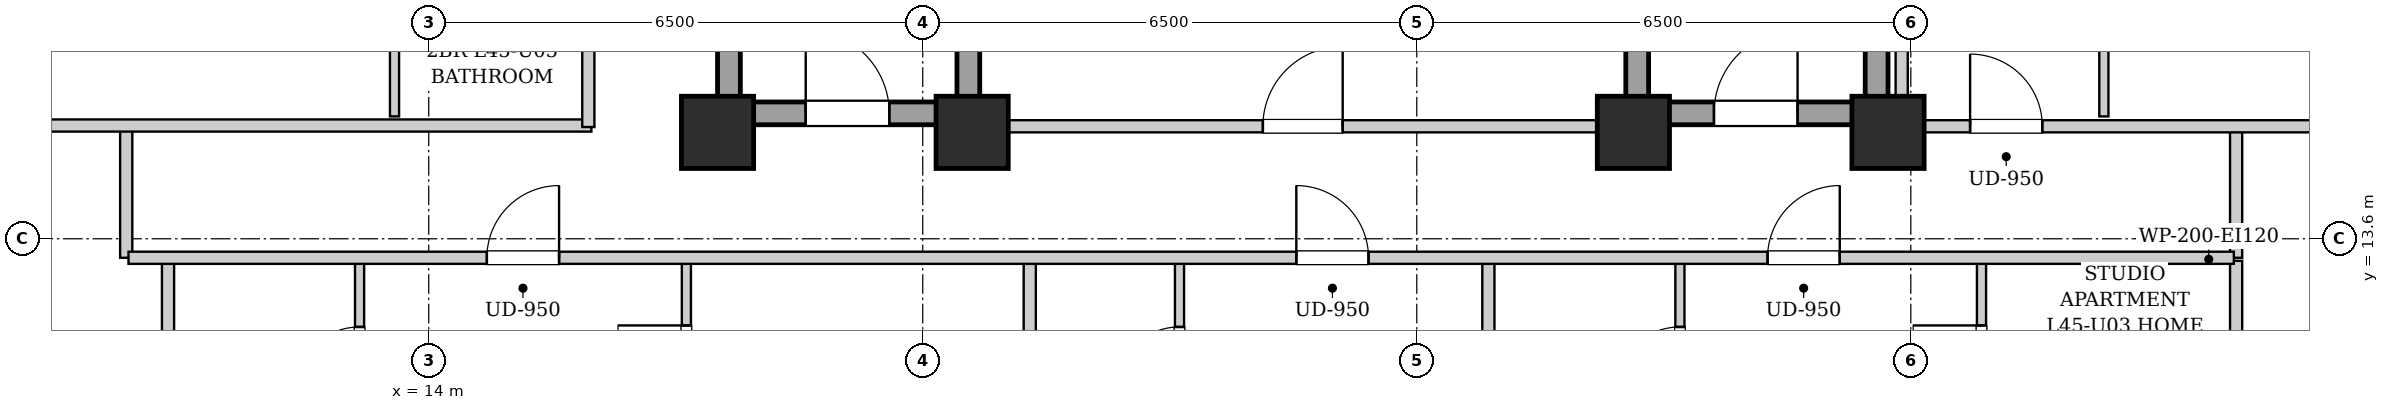
"""IFC4 building model, lengths in metres.
Left out: names, types, materials, properties, quantities, classifications, styles, units other than length and angle.
Written with IfcOpenShell. Run it as: python <this file> out.ifc"""

import sys

from ifc_helpers import new_model, si_unit, direction, frame, frame_2d, origin, origin_2d, place, context, subcontext, project, spatial, rectangle, extrude, element, fill, save


model = new_model("IFC4")
c1 = context("Model", 3, precision=1e-05, world=origin(), true_north=direction((0.0, 1.0)))
c2 = subcontext(c1, "Body", "Model", "MODEL_VIEW")
j1 = project(units=[si_unit("LENGTHUNIT", "METRE"), si_unit("PLANEANGLEUNIT", "RADIAN")], contexts=[c1])
p1 = place(None, origin())
s1 = spatial("IfcSite", under=j1, at=p1, CompositionType="ELEMENT")
p2 = place(p1, origin())
s2 = spatial("IfcBuilding", under=s1, at=p2, CompositionType="ELEMENT")
p3 = place(p2, frame((0.0, 0.0, 156.9)))
s3 = spatial("IfcBuildingStorey", under=s2, at=p3, CompositionType="ELEMENT", Elevation=156.9)
for number, where, z_axis, x_axis in (
    (1, (17.8, 15.0, 0.0), (0.0, 0.0, 1.0), (1.0, 0.0, 0.0)),
    (2, (21.15, 15.0, 0.0), (0.0, 0.0, 1.0), (1.0, 0.0, 0.0)),
    (3, (29.85, 15.0, 0.0), (0.0, 0.0, 1.0), (1.0, 0.0, 0.0)),
    (4, (33.2, 15.0, 0.0), (0.0, 0.0, 1.0), (1.0, 0.0, 0.0)),
):
    element("IfcColumn", number, at=place(p3, frame(where, z_axis=z_axis, x_axis=x_axis)), inside=s3, PredefinedType="COLUMN", context=c2, shape_type="SweptSolid", body=[
        extrude(rectangle(XDim=0.95, YDim=0.95, at=origin_2d()), origin(), (0.0, 0.0, 1.0), 3.25),
    ])
for number, where, z_axis, x_axis in (
    (5, (17.95, 15.1, 0.0), (0.0, 0.0, 1.0), (0.0, 1.0, 0.0)),
    (6, (21.1, 15.1, 0.0), (0.0, 0.0, 1.0), (0.0, 1.0, 0.0)),
):
    element("IfcWall", number, at=place(p3, frame(where, z_axis=z_axis, x_axis=x_axis)), inside=s3, PredefinedType="SHEAR", context=c2, shape_type="SweptSolid", body=[
        extrude(rectangle(XDim=9.0, YDim=0.3, at=frame_2d((4.5, 0.0))), origin(), (0.0, 0.0, 1.0), 2.99),
    ])
p4 = place(p3, frame((18.1, 15.25, 0.0), z_axis=(0.0, 0.0, 1.0), x_axis=(1.0, 0.0, 0.0)))
e7 = element("IfcWall", 7, at=p4, inside=s3, PredefinedType="SHEAR", context=c2, shape_type="SweptSolid", body=[
    extrude(rectangle(XDim=2.85, YDim=0.3, at=frame_2d((1.425, 0.0))), origin(), (0.0, 0.0, 1.0), 2.99),
])
p5 = place(p4, frame((0.86, 0.0, 0.0)))
e8 = element("IfcOpeningElement", 8, at=p5, cuts=e7, PredefinedType="OPENING", context=c2, shape_type="SweptSolid", body=[
    extrude(rectangle(XDim=1.1, YDim=2.05, at=frame_2d((0.55, 1.025))), frame((0.0, 0.16, 0.0), z_axis=(0.0, -1.0, 0.0), x_axis=(1.0, 0.0, 0.0)), (0.0, 0.0, 1.0), 0.32),
])
for number, where, z_axis, x_axis in (
    (9, (29.9, 15.1, 0.0), (0.0, 0.0, 1.0), (0.0, 1.0, 0.0)),
    (10, (33.05, 15.1, 0.0), (0.0, 0.0, 1.0), (0.0, 1.0, 0.0)),
):
    element("IfcWall", number, at=place(p3, frame(where, z_axis=z_axis, x_axis=x_axis)), inside=s3, PredefinedType="SHEAR", context=c2, shape_type="SweptSolid", body=[
        extrude(rectangle(XDim=9.0, YDim=0.3, at=frame_2d((4.5, 0.0))), origin(), (0.0, 0.0, 1.0), 2.99),
    ])
p6 = place(p3, frame((30.05, 15.25, 0.0), z_axis=(0.0, 0.0, 1.0), x_axis=(1.0, 0.0, 0.0)))
e11 = element("IfcWall", 11, at=p6, inside=s3, PredefinedType="SHEAR", context=c2, shape_type="SweptSolid", body=[
    extrude(rectangle(XDim=2.85, YDim=0.3, at=frame_2d((1.425, 0.0))), origin(), (0.0, 0.0, 1.0), 2.99),
])
p7 = place(p6, frame((0.86, 0.0, 0.0)))
e12 = element("IfcOpeningElement", 12, at=p7, cuts=e11, PredefinedType="OPENING", context=c2, shape_type="SweptSolid", body=[
    extrude(rectangle(XDim=1.1, YDim=2.05, at=frame_2d((0.55, 1.025))), frame((0.0, 0.16, 0.0), z_axis=(0.0, -1.0, 0.0), x_axis=(1.0, 0.0, 0.0)), (0.0, 0.0, 1.0), 0.32),
])
p8 = place(p3, frame((21.25, 15.08, 0.0), z_axis=(0.0, 0.0, 1.0), x_axis=(1.0, 0.0, 0.0)))
e13 = element("IfcWall", 13, at=p8, inside=s3, PredefinedType="PARTITIONING", context=c2, shape_type="SweptSolid", body=[
    extrude(rectangle(XDim=8.5, YDim=0.16, at=frame_2d((4.25, 0.0))), origin(), (0.0, 0.0, 1.0), 2.442),
])
p9 = place(p8, frame((3.725, 0.0, 0.0)))
e14 = element("IfcOpeningElement", 14, at=p9, cuts=e13, PredefinedType="OPENING", context=c2, shape_type="SweptSolid", body=[
    extrude(rectangle(XDim=1.05, YDim=2.05, at=frame_2d((0.525, 1.025))), frame((0.0, 0.09, 0.0), z_axis=(0.0, -1.0, 0.0), x_axis=(1.0, 0.0, 0.0)), (0.0, 0.0, 1.0), 0.18),
])
for number, where, z_axis, x_axis in (
    (15, (10.02, 13.35, 0.0), (0.0, 0.0, 1.0), (0.0, 1.0, 0.0)),
    (16, (37.78, 13.35, 0.0), (0.0, 0.0, 1.0), (0.0, 1.0, 0.0)),
):
    element("IfcWall", number, at=place(p3, frame(where, z_axis=z_axis, x_axis=x_axis)), inside=s3, PredefinedType="PARTITIONING", context=c2, shape_type="SweptSolid", body=[
        extrude(rectangle(XDim=1.74, YDim=0.16, at=frame_2d((0.87, 0.0))), origin(), (0.0, 0.0, 1.0), 2.99),
    ])
p10 = place(p3, frame((7.78, 15.09, 0.0), z_axis=(0.0, 0.0, 1.0), x_axis=(1.0, 0.0, 0.0)))
e17 = element("IfcWall", 17, at=p10, inside=s3, PredefinedType="PARTITIONING", context=c2, shape_type="SweptSolid", body=[
    extrude(rectangle(XDim=8.36, YDim=0.16, at=frame_2d((4.18, 0.0))), origin(), (0.0, 0.0, 1.0), 2.442),
])
p11 = place(p3, frame((10.57, 4.08, 0.0), z_axis=(0.0, 0.0, 1.0), x_axis=(0.0, 1.0, 0.0)))
e18 = element("IfcWall", 18, at=p11, inside=s3, PredefinedType="PARTITIONING", context=c2, shape_type="SweptSolid", body=[
    extrude(rectangle(XDim=9.23, YDim=0.16, at=frame_2d((4.615, 0.0))), origin(), (0.0, 0.0, 1.0), 2.99),
])
p12 = place(p3, frame((13.09, 10.71, 0.0), z_axis=(0.0, 0.0, 1.0), x_axis=(0.0, 1.0, 0.0)))
e19 = element("IfcWall", 19, at=p12, inside=s3, PredefinedType="PARTITIONING", context=c2, shape_type="SweptSolid", body=[
    extrude(rectangle(XDim=2.6, YDim=0.12, at=frame_2d((1.3, 0.0))), origin(), (0.0, 0.0, 1.0), 2.99),
])
p13 = place(p12, frame((0.87, 0.0, 0.0)))
e20 = element("IfcOpeningElement", 20, at=p13, cuts=e19, PredefinedType="OPENING", context=c2, shape_type="SweptSolid", body=[
    extrude(rectangle(XDim=0.86, YDim=2.05, at=frame_2d((0.43, 1.025))), frame((0.0, 0.07, 0.0), z_axis=(0.0, -1.0, 0.0), x_axis=(1.0, 0.0, 0.0)), (0.0, 0.0, 1.0), 0.14),
])
p14 = place(p3, frame((17.39, 10.71, 0.0), z_axis=(0.0, 0.0, 1.0), x_axis=(0.0, 1.0, 0.0)))
e21 = element("IfcWall", 21, at=p14, inside=s3, PredefinedType="PARTITIONING", context=c2, shape_type="SweptSolid", body=[
    extrude(rectangle(XDim=2.6, YDim=0.12, at=frame_2d((1.3, 0.0))), origin(), (0.0, 0.0, 1.0), 2.99),
])
p15 = place(p14, frame((0.85, 0.0, 0.0)))
e22 = element("IfcOpeningElement", 22, at=p15, cuts=e21, PredefinedType="OPENING", context=c2, shape_type="SweptSolid", body=[
    extrude(rectangle(XDim=0.9, YDim=2.05, at=frame_2d((0.45, 1.025))), frame((0.0, 0.07, 0.0), z_axis=(0.0, -1.0, 0.0), x_axis=(1.0, 0.0, 0.0)), (0.0, 0.0, 1.0), 0.14),
])
p16 = place(p3, frame((21.908, 4.08, 0.0), z_axis=(0.0, 0.0, 1.0), x_axis=(0.0, 1.0, 0.0)))
e23 = element("IfcWall", 23, at=p16, inside=s3, PredefinedType="PARTITIONING", context=c2, shape_type="SweptSolid", body=[
    extrude(rectangle(XDim=9.23, YDim=0.16, at=frame_2d((4.615, 0.0))), origin(), (0.0, 0.0, 1.0), 2.99),
])
p17 = place(p3, frame((23.878, 10.71, 0.0), z_axis=(0.0, 0.0, 1.0), x_axis=(0.0, 1.0, 0.0)))
e24 = element("IfcWall", 24, at=p17, inside=s3, PredefinedType="PARTITIONING", context=c2, shape_type="SweptSolid", body=[
    extrude(rectangle(XDim=2.6, YDim=0.12, at=frame_2d((1.3, 0.0))), origin(), (0.0, 0.0, 1.0), 2.99),
])
p18 = place(p17, frame((0.87, 0.0, 0.0)))
e25 = element("IfcOpeningElement", 25, at=p18, cuts=e24, PredefinedType="OPENING", context=c2, shape_type="SweptSolid", body=[
    extrude(rectangle(XDim=0.86, YDim=2.05, at=frame_2d((0.43, 1.025))), frame((0.0, 0.07, 0.0), z_axis=(0.0, -1.0, 0.0), x_axis=(1.0, 0.0, 0.0)), (0.0, 0.0, 1.0), 0.14),
])
p19 = place(p3, frame((37.78, 10.65, 0.0), z_axis=(0.0, 0.0, 1.0), x_axis=(0.0, 1.0, 0.0)))
e26 = element("IfcWall", 26, at=p19, inside=s3, PredefinedType="PARTITIONING", context=c2, shape_type="SweptSolid", body=[
    extrude(rectangle(XDim=2.66, YDim=0.16, at=frame_2d((1.33, 0.0))), origin(), (0.0, 0.0, 1.0), 2.99),
])
p20 = place(p3, frame((27.942, 4.08, 0.0), z_axis=(0.0, 0.0, 1.0), x_axis=(0.0, 1.0, 0.0)))
e27 = element("IfcWall", 27, at=p20, inside=s3, PredefinedType="PARTITIONING", context=c2, shape_type="SweptSolid", body=[
    extrude(rectangle(XDim=9.23, YDim=0.16, at=frame_2d((4.615, 0.0))), origin(), (0.0, 0.0, 1.0), 2.99),
])
p21 = place(p3, frame((30.462, 10.71, 0.0), z_axis=(0.0, 0.0, 1.0), x_axis=(0.0, 1.0, 0.0)))
e28 = element("IfcWall", 28, at=p21, inside=s3, PredefinedType="PARTITIONING", context=c2, shape_type="SweptSolid", body=[
    extrude(rectangle(XDim=2.6, YDim=0.12, at=frame_2d((1.3, 0.0))), origin(), (0.0, 0.0, 1.0), 2.99),
])
p22 = place(p21, frame((0.87, 0.0, 0.0)))
e29 = element("IfcOpeningElement", 29, at=p22, cuts=e28, PredefinedType="OPENING", context=c2, shape_type="SweptSolid", body=[
    extrude(rectangle(XDim=0.86, YDim=2.05, at=frame_2d((0.43, 1.025))), frame((0.0, 0.07, 0.0), z_axis=(0.0, -1.0, 0.0), x_axis=(1.0, 0.0, 0.0)), (0.0, 0.0, 1.0), 0.14),
])
p23 = place(p3, frame((34.43, 10.71, 0.0), z_axis=(0.0, 0.0, 1.0), x_axis=(0.0, 1.0, 0.0)))
e30 = element("IfcWall", 30, at=p23, inside=s3, PredefinedType="PARTITIONING", context=c2, shape_type="SweptSolid", body=[
    extrude(rectangle(XDim=2.6, YDim=0.12, at=frame_2d((1.3, 0.0))), origin(), (0.0, 0.0, 1.0), 2.99),
])
p24 = place(p23, frame((0.85, 0.0, 0.0)))
e31 = element("IfcOpeningElement", 31, at=p24, cuts=e30, PredefinedType="OPENING", context=c2, shape_type="SweptSolid", body=[
    extrude(rectangle(XDim=0.9, YDim=2.05, at=frame_2d((0.45, 1.025))), frame((0.0, 0.07, 0.0), z_axis=(0.0, -1.0, 0.0), x_axis=(1.0, 0.0, 0.0)), (0.0, 0.0, 1.0), 0.14),
])
p25 = place(p3, frame((13.55, 15.21, 0.0), z_axis=(0.0, 0.0, 1.0), x_axis=(0.0, 1.0, 0.0)))
e32 = element("IfcWall", 32, at=p25, inside=s3, PredefinedType="PARTITIONING", context=c2, shape_type="SweptSolid", body=[
    extrude(rectangle(XDim=2.3, YDim=0.12, at=frame_2d((1.15, 0.0))), origin(), (0.0, 0.0, 1.0), 2.99),
])
p26 = place(p3, frame((33.38, 15.08, 0.0), z_axis=(0.0, 0.0, 1.0), x_axis=(1.0, 0.0, 0.0)))
e33 = element("IfcWall", 33, at=p26, inside=s3, PredefinedType="PARTITIONING", context=c2, shape_type="SweptSolid", body=[
    extrude(rectangle(XDim=6.64, YDim=0.16, at=frame_2d((3.32, 0.0))), origin(), (0.0, 0.0, 1.0), 2.442),
])
p27 = place(p26, frame((0.9, 0.0, 0.0)))
e34 = element("IfcOpeningElement", 34, at=p27, cuts=e33, PredefinedType="OPENING", context=c2, shape_type="SweptSolid", body=[
    extrude(rectangle(XDim=0.95, YDim=2.1, at=frame_2d((0.475, 1.05))), frame((0.0, 0.09, 0.0), z_axis=(0.0, -1.0, 0.0), x_axis=(1.0, 0.0, 0.0)), (0.0, 0.0, 1.0), 0.18),
])
p28 = place(p3, frame((36.04, 15.21, 0.0), z_axis=(0.0, 0.0, 1.0), x_axis=(0.0, 1.0, 0.0)))
e35 = element("IfcWall", 35, at=p28, inside=s3, PredefinedType="PARTITIONING", context=c2, shape_type="SweptSolid", body=[
    extrude(rectangle(XDim=4.308, YDim=0.12, at=frame_2d((2.154, 0.0))), origin(), (0.0, 0.0, 1.0), 2.99),
])
p29 = place(p28, frame((1.704, 0.0, 0.0)))
e36 = element("IfcOpeningElement", 36, at=p29, cuts=e35, PredefinedType="OPENING", context=c2, shape_type="SweptSolid", body=[
    extrude(rectangle(XDim=0.9, YDim=2.05, at=frame_2d((0.45, 1.025))), frame((0.0, 0.07, 0.0), z_axis=(0.0, -1.0, 0.0), x_axis=(1.0, 0.0, 0.0)), (0.0, 0.0, 1.0), 0.14),
])
p30 = place(p3, frame((10.05, 13.35, 0.0), z_axis=(0.0, 0.0, 1.0), x_axis=(1.0, 0.0, 0.0)))
e37 = element("IfcWall", 37, at=p30, inside=s3, PredefinedType="PARTITIONING", context=c2, shape_type="SweptSolid", body=[
    extrude(rectangle(XDim=27.7, YDim=0.16, at=frame_2d((13.85, 0.0))), origin(), (0.0, 0.0, 1.0), 2.99),
])
p31 = place(p30, frame((4.715, 0.0, 0.0)))
e38 = element("IfcOpeningElement", 38, at=p31, cuts=e37, PredefinedType="OPENING", context=c2, shape_type="SweptSolid", body=[
    extrude(rectangle(XDim=0.95, YDim=2.1, at=frame_2d((0.475, 1.05))), frame((0.0, 0.09, 0.0), z_axis=(0.0, -1.0, 0.0), x_axis=(1.0, 0.0, 0.0)), (0.0, 0.0, 1.0), 0.18),
])
p32 = place(p30, frame((15.365, 0.0, 0.0)))
e39 = element("IfcOpeningElement", 39, at=p32, cuts=e37, PredefinedType="OPENING", context=c2, shape_type="SweptSolid", body=[
    extrude(rectangle(XDim=0.95, YDim=2.1, at=frame_2d((0.475, 1.05))), frame((0.0, 0.09, 0.0), z_axis=(0.0, -1.0, 0.0), x_axis=(1.0, 0.0, 0.0)), (0.0, 0.0, 1.0), 0.18),
])
p33 = place(p30, frame((21.565, 0.0, 0.0)))
e40 = element("IfcOpeningElement", 40, at=p33, cuts=e37, PredefinedType="OPENING", context=c2, shape_type="SweptSolid", body=[
    extrude(rectangle(XDim=0.95, YDim=2.1, at=frame_2d((0.475, 1.05))), frame((0.0, 0.09, 0.0), z_axis=(0.0, -1.0, 0.0), x_axis=(1.0, 0.0, 0.0)), (0.0, 0.0, 1.0), 0.18),
])
p34 = place(p3, frame((16.1, 15.07, 0.0), z_axis=(0.0, 0.0, 1.0), x_axis=(0.0, 1.0, 0.0)))
e41 = element("IfcWall", 41, at=p34, inside=s3, PredefinedType="PARTITIONING", context=c2, shape_type="SweptSolid", body=[
    extrude(rectangle(XDim=13.93, YDim=0.16, at=frame_2d((6.965, 0.0))), origin(), (0.0, 0.0, 1.0), 2.99),
])
p35 = place(p34, frame((4.385, 0.0, 0.0)))
e42 = element("IfcOpeningElement", 42, at=p35, cuts=e41, PredefinedType="OPENING", context=c2, shape_type="SweptSolid", body=[
    extrude(rectangle(XDim=0.95, YDim=2.1, at=frame_2d((0.475, 1.05))), frame((0.0, 0.09, 0.0), z_axis=(0.0, -1.0, 0.0), x_axis=(1.0, 0.0, 0.0)), (0.0, 0.0, 1.0), 0.18),
])
p36 = place(p3, frame((33.38, 15.02, 0.0), z_axis=(0.0, 0.0, 1.0), x_axis=(0.0, 1.0, 0.0)))
e43 = element("IfcWall", 43, at=p36, inside=s3, PredefinedType="PARTITIONING", context=c2, shape_type="SweptSolid", body=[
    extrude(rectangle(XDim=13.98, YDim=0.16, at=frame_2d((6.99, 0.0))), origin(), (0.0, 0.0, 1.0), 2.325),
])
p37 = place(p5, origin())
e44 = element("IfcDoor", 44, at=p37, inside=s3, OperationType="SINGLE_SWING_LEFT", PredefinedType="DOOR", context=c2, shape_type="SweptSolid", body=[
    extrude(rectangle(XDim=1.1, YDim=2.05, at=frame_2d((0.55, 1.025))), frame((0.0, 0.025, 0.0), z_axis=(0.0, -1.0, 0.0), x_axis=(1.0, 0.0, 0.0)), (0.0, 0.0, 1.0), 0.05),
])
fill(e8, e44)
p38 = place(p7, origin())
e45 = element("IfcDoor", 45, at=p38, inside=s3, OperationType="SINGLE_SWING_RIGHT", PredefinedType="DOOR", context=c2, shape_type="SweptSolid", body=[
    extrude(rectangle(XDim=1.1, YDim=2.05, at=frame_2d((0.55, 1.025))), frame((0.0, 0.025, 0.0), z_axis=(0.0, -1.0, 0.0), x_axis=(1.0, 0.0, 0.0)), (0.0, 0.0, 1.0), 0.05),
])
fill(e12, e45)
p39 = place(p9, origin())
e46 = element("IfcDoor", 46, at=p39, inside=s3, OperationType="SINGLE_SWING_RIGHT", PredefinedType="DOOR", context=c2, shape_type="SweptSolid", body=[
    extrude(rectangle(XDim=1.05, YDim=2.05, at=frame_2d((0.525, 1.025))), frame((0.0, 0.025, 0.0), z_axis=(0.0, -1.0, 0.0), x_axis=(1.0, 0.0, 0.0)), (0.0, 0.0, 1.0), 0.05),
])
fill(e14, e46)
p40 = place(p13, origin())
e47 = element("IfcDoor", 47, at=p40, inside=s3, OperationType="SINGLE_SWING_LEFT", PredefinedType="DOOR", context=c2, shape_type="SweptSolid", body=[
    extrude(rectangle(XDim=0.86, YDim=2.05, at=frame_2d((0.43, 1.025))), frame((0.0, 0.025, 0.0), z_axis=(0.0, -1.0, 0.0), x_axis=(1.0, 0.0, 0.0)), (0.0, 0.0, 1.0), 0.05),
])
fill(e20, e47)
p41 = place(p15, origin())
e48 = element("IfcDoor", 48, at=p41, inside=s3, OperationType="SINGLE_SWING_RIGHT", PredefinedType="DOOR", context=c2, shape_type="SweptSolid", body=[
    extrude(rectangle(XDim=0.9, YDim=2.05, at=frame_2d((0.45, 1.025))), frame((0.0, 0.025, 0.0), z_axis=(0.0, -1.0, 0.0), x_axis=(1.0, 0.0, 0.0)), (0.0, 0.0, 1.0), 0.05),
])
fill(e22, e48)
p42 = place(p18, origin())
e49 = element("IfcDoor", 49, at=p42, inside=s3, OperationType="SINGLE_SWING_LEFT", PredefinedType="DOOR", context=c2, shape_type="SweptSolid", body=[
    extrude(rectangle(XDim=0.86, YDim=2.05, at=frame_2d((0.43, 1.025))), frame((0.0, 0.025, 0.0), z_axis=(0.0, -1.0, 0.0), x_axis=(1.0, 0.0, 0.0)), (0.0, 0.0, 1.0), 0.05),
])
fill(e25, e49)
p43 = place(p22, origin())
e50 = element("IfcDoor", 50, at=p43, inside=s3, OperationType="SINGLE_SWING_LEFT", PredefinedType="DOOR", context=c2, shape_type="SweptSolid", body=[
    extrude(rectangle(XDim=0.86, YDim=2.05, at=frame_2d((0.43, 1.025))), frame((0.0, 0.025, 0.0), z_axis=(0.0, -1.0, 0.0), x_axis=(1.0, 0.0, 0.0)), (0.0, 0.0, 1.0), 0.05),
])
fill(e29, e50)
p44 = place(p24, origin())
e51 = element("IfcDoor", 51, at=p44, inside=s3, OperationType="SINGLE_SWING_RIGHT", PredefinedType="DOOR", context=c2, shape_type="SweptSolid", body=[
    extrude(rectangle(XDim=0.9, YDim=2.05, at=frame_2d((0.45, 1.025))), frame((0.0, 0.025, 0.0), z_axis=(0.0, -1.0, 0.0), x_axis=(1.0, 0.0, 0.0)), (0.0, 0.0, 1.0), 0.05),
])
fill(e31, e51)
p45 = place(p27, origin())
e52 = element("IfcDoor", 52, at=p45, inside=s3, OperationType="SINGLE_SWING_LEFT", PredefinedType="DOOR", context=c2, shape_type="SweptSolid", body=[
    extrude(rectangle(XDim=0.95, YDim=2.1, at=frame_2d((0.475, 1.05))), frame((0.0, 0.025, 0.0), z_axis=(0.0, -1.0, 0.0), x_axis=(1.0, 0.0, 0.0)), (0.0, 0.0, 1.0), 0.05),
])
fill(e34, e52)
p46 = place(p31, origin())
e53 = element("IfcDoor", 53, at=p46, inside=s3, OperationType="SINGLE_SWING_RIGHT", PredefinedType="DOOR", context=c2, shape_type="SweptSolid", body=[
    extrude(rectangle(XDim=0.95, YDim=2.1, at=frame_2d((0.475, 1.05))), frame((0.0, 0.025, 0.0), z_axis=(0.0, -1.0, 0.0), x_axis=(1.0, 0.0, 0.0)), (0.0, 0.0, 1.0), 0.05),
])
fill(e38, e53)
p47 = place(p32, origin())
e54 = element("IfcDoor", 54, at=p47, inside=s3, OperationType="SINGLE_SWING_LEFT", PredefinedType="DOOR", context=c2, shape_type="SweptSolid", body=[
    extrude(rectangle(XDim=0.95, YDim=2.1, at=frame_2d((0.475, 1.05))), frame((0.0, 0.025, 0.0), z_axis=(0.0, -1.0, 0.0), x_axis=(1.0, 0.0, 0.0)), (0.0, 0.0, 1.0), 0.05),
])
fill(e39, e54)
p48 = place(p33, origin())
e55 = element("IfcDoor", 55, at=p48, inside=s3, OperationType="SINGLE_SWING_RIGHT", PredefinedType="DOOR", context=c2, shape_type="SweptSolid", body=[
    extrude(rectangle(XDim=0.95, YDim=2.1, at=frame_2d((0.475, 1.05))), frame((0.0, 0.025, 0.0), z_axis=(0.0, -1.0, 0.0), x_axis=(1.0, 0.0, 0.0)), (0.0, 0.0, 1.0), 0.05),
])
fill(e40, e55)
save(model, sys.argv[1])
